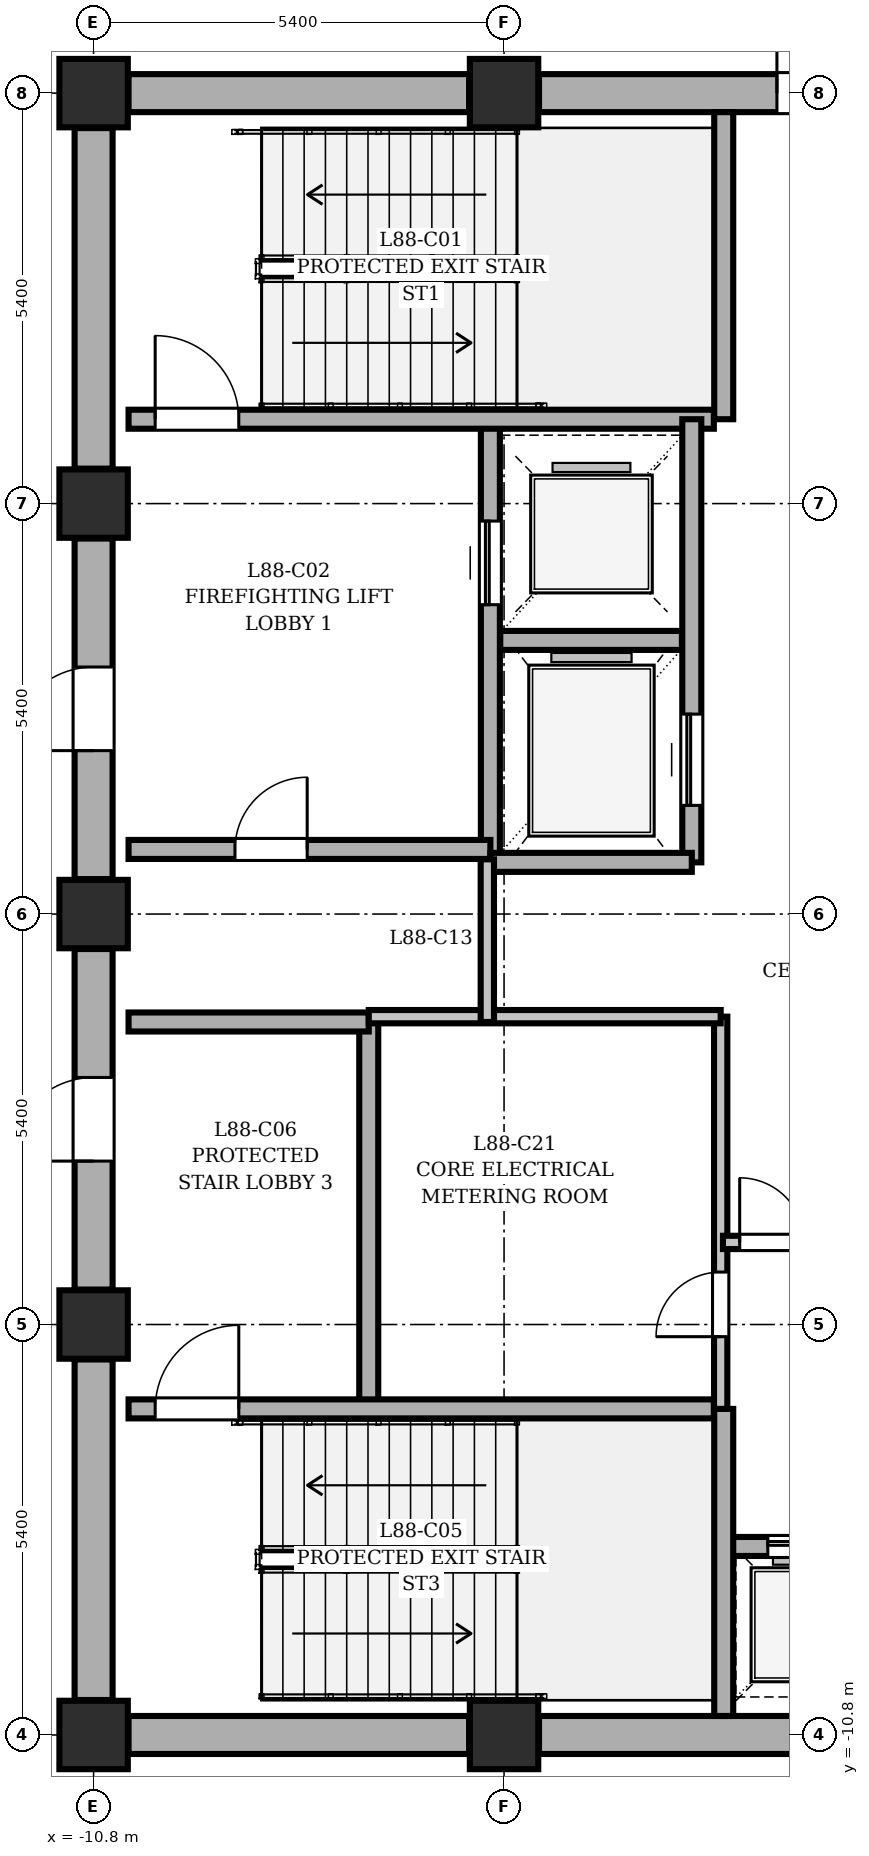
"""IFC4 building model, lengths in metres.
Left out: names, types, materials, properties, quantities, classifications, styles, units other than length and angle.
Written with IfcOpenShell. Run it as: python <this file> out.ifc"""

import sys

from ifc_helpers import new_model, si_unit, direction, frame, frame_2d, origin, origin_2d, place, context, subcontext, project, spatial, rectangle, extrude, element, fill, save


model = new_model("IFC4")
c1 = context("Model", 3, precision=1e-05, world=origin(), true_north=direction((0.0, 1.0)))
c2 = subcontext(c1, "Body", "Model", "MODEL_VIEW")
j1 = project(units=[si_unit("LENGTHUNIT", "METRE"), si_unit("PLANEANGLEUNIT", "RADIAN")], contexts=[c1])
p1 = place(None, origin())
s1 = spatial("IfcSite", under=j1, at=p1, CompositionType="ELEMENT")
p2 = place(p1, origin())
s2 = spatial("IfcBuilding", under=s1, at=p2, CompositionType="ELEMENT")
p3 = place(p2, frame((0.0, 0.0, 337.5)))
s3 = spatial("IfcBuildingStorey", under=s2, at=p3, CompositionType="ELEMENT", Elevation=337.5)
for number, where, z_axis, x_axis in (
    (1, (-10.8, -10.8, 0.0), (0.0, 0.0, 1.0), (1.0, 0.0, 0.0)),
    (2, (-10.8, -5.4, 0.0), (0.0, 0.0, 1.0), (1.0, 0.0, 0.0)),
    (3, (-10.8, 0.0, 0.0), (0.0, 0.0, 1.0), (1.0, 0.0, 0.0)),
    (4, (-10.8, 5.4, 0.0), (0.0, 0.0, 1.0), (1.0, 0.0, 0.0)),
    (5, (-10.8, 10.8, 0.0), (0.0, 0.0, 1.0), (1.0, 0.0, 0.0)),
    (6, (-5.4, -10.8, 0.0), (0.0, 0.0, 1.0), (1.0, 0.0, 0.0)),
    (7, (-5.4, 10.8, 0.0), (0.0, 0.0, 1.0), (1.0, 0.0, 0.0)),
):
    element("IfcColumn", number, at=place(p3, frame(where, z_axis=z_axis, x_axis=x_axis)), inside=s3, PredefinedType="COLUMN", context=c2, shape_type="SweptSolid", body=[
        extrude(rectangle(XDim=0.9, YDim=0.9, at=origin_2d()), origin(), (0.0, 0.0, 1.0), 4.5),
    ])
for number, where, z_axis, x_axis in (
    (8, (-10.34, -10.8, 0.0), (0.0, 0.0, 1.0), (1.0, 0.0, 0.0)),
    (9, (-10.34, 10.8, 0.0), (0.0, 0.0, 1.0), (1.0, 0.0, 0.0)),
    (10, (-10.8, -10.34, 0.0), (0.0, 0.0, 1.0), (0.0, 1.0, 0.0)),
    (11, (-4.94, -10.8, 0.0), (0.0, 0.0, 1.0), (1.0, 0.0, 0.0)),
):
    element("IfcWall", number, at=place(p3, frame(where, z_axis=z_axis, x_axis=x_axis)), inside=s3, PredefinedType="SHEAR", context=c2, shape_type="SweptSolid", body=[
        extrude(rectangle(XDim=4.48, YDim=0.5, at=frame_2d((2.24, 0.0))), origin(), (0.0, 0.0, 1.0), 4.5),
    ])
p4 = place(p3, frame((-4.94, 10.8, 0.0), z_axis=(0.0, 0.0, 1.0), x_axis=(1.0, 0.0, 0.0)))
e12 = element("IfcWall", 12, at=p4, inside=s3, PredefinedType="SHEAR", context=c2, shape_type="SweptSolid", body=[
    extrude(rectangle(XDim=4.48, YDim=0.5, at=frame_2d((2.24, 0.0))), origin(), (0.0, 0.0, 1.0), 4.5),
])
p5 = place(p4, frame((3.13, 0.0, 0.0)))
e13 = element("IfcOpeningElement", 13, at=p5, cuts=e12, PredefinedType="OPENING", context=c2, shape_type="SweptSolid", body=[
    extrude(rectangle(XDim=1.1, YDim=2.1, at=frame_2d((0.55, 1.05))), frame((0.0, 0.26, 0.0), z_axis=(0.0, -1.0, 0.0), x_axis=(1.0, 0.0, 0.0)), (0.0, 0.0, 1.0), 0.52),
])
p6 = place(p3, frame((-10.8, -4.94, 0.0), z_axis=(0.0, 0.0, 1.0), x_axis=(0.0, 1.0, 0.0)))
e14 = element("IfcWall", 14, at=p6, inside=s3, PredefinedType="SHEAR", context=c2, shape_type="SweptSolid", body=[
    extrude(rectangle(XDim=4.48, YDim=0.5, at=frame_2d((2.24, 0.0))), origin(), (0.0, 0.0, 1.0), 4.5),
])
p7 = place(p6, frame((1.69, 0.0, 0.0)))
e15 = element("IfcOpeningElement", 15, at=p7, cuts=e14, PredefinedType="OPENING", context=c2, shape_type="SweptSolid", body=[
    extrude(rectangle(XDim=1.1, YDim=2.1, at=frame_2d((0.55, 1.05))), frame((0.0, 0.26, 0.0), z_axis=(0.0, -1.0, 0.0), x_axis=(1.0, 0.0, 0.0)), (0.0, 0.0, 1.0), 0.52),
])
p8 = place(p3, frame((-10.8, 0.46, 0.0), z_axis=(0.0, 0.0, 1.0), x_axis=(0.0, 1.0, 0.0)))
e16 = element("IfcWall", 16, at=p8, inside=s3, PredefinedType="SHEAR", context=c2, shape_type="SweptSolid", body=[
    extrude(rectangle(XDim=4.48, YDim=0.5, at=frame_2d((2.24, 0.0))), origin(), (0.0, 0.0, 1.0), 4.5),
])
p9 = place(p8, frame((1.69, 0.0, 0.0)))
e17 = element("IfcOpeningElement", 17, at=p9, cuts=e16, PredefinedType="OPENING", context=c2, shape_type="SweptSolid", body=[
    extrude(rectangle(XDim=1.1, YDim=2.1, at=frame_2d((0.55, 1.05))), frame((0.0, 0.26, 0.0), z_axis=(0.0, -1.0, 0.0), x_axis=(1.0, 0.0, 0.0)), (0.0, 0.0, 1.0), 0.52),
])
p10 = place(p3, frame((-10.8, 5.86, 0.0), z_axis=(0.0, 0.0, 1.0), x_axis=(0.0, 1.0, 0.0)))
e18 = element("IfcWall", 18, at=p10, inside=s3, PredefinedType="SHEAR", context=c2, shape_type="SweptSolid", body=[
    extrude(rectangle(XDim=4.48, YDim=0.5, at=frame_2d((2.24, 0.0))), origin(), (0.0, 0.0, 1.0), 4.5),
])
p11 = place(p3, frame((-5.58, 0.72, 0.0), z_axis=(0.0, 0.0, 1.0), x_axis=(0.0, 1.0, 0.0)))
e19 = element("IfcWall", 19, at=p11, inside=s3, PredefinedType="SHEAR", context=c2, shape_type="SweptSolid", body=[
    extrude(rectangle(XDim=5.79, YDim=0.25, at=frame_2d((2.895, 0.0))), origin(), (0.0, 0.0, 1.0), 4.5),
])
p12 = place(p11, frame((3.35, 0.0, 0.0)))
e20 = element("IfcOpeningElement", 20, at=p12, cuts=e19, PredefinedType="OPENING", context=c2, shape_type="SweptSolid", body=[
    extrude(rectangle(XDim=1.1, YDim=2.1, at=frame_2d((0.55, 1.05))), frame((0.0, 0.135, 0.0), z_axis=(0.0, -1.0, 0.0), x_axis=(1.0, 0.0, 0.0)), (0.0, 0.0, 1.0), 0.27),
])
p13 = place(p3, frame((-10.34, 0.85, 0.0), z_axis=(0.0, 0.0, 1.0), x_axis=(1.0, 0.0, 0.0)))
e21 = element("IfcWall", 21, at=p13, inside=s3, PredefinedType="SHEAR", context=c2, shape_type="SweptSolid", body=[
    extrude(rectangle(XDim=4.76, YDim=0.25, at=frame_2d((2.38, 0.0))), origin(), (0.0, 0.0, 1.0), 4.5),
])
p14 = place(p13, frame((1.4, 0.0, 0.0)))
e22 = element("IfcOpeningElement", 22, at=p14, cuts=e21, PredefinedType="OPENING", context=c2, shape_type="SweptSolid", body=[
    extrude(rectangle(XDim=0.95, YDim=2.1, at=frame_2d((0.475, 1.05))), frame((0.0, 0.135, 0.0), z_axis=(0.0, -1.0, 0.0), x_axis=(1.0, 0.0, 0.0)), (0.0, 0.0, 1.0), 0.27),
])
p15 = place(p3, frame((-2.48, -8.32, 0.0), z_axis=(0.0, 0.0, 1.0), x_axis=(1.0, 0.0, 0.0)))
e23 = element("IfcWall", 23, at=p15, inside=s3, PredefinedType="SHEAR", context=c2, shape_type="SweptSolid", body=[
    extrude(rectangle(XDim=4.93, YDim=0.25, at=frame_2d((2.465, 0.0))), origin(), (0.0, 0.0, 1.0), 4.5),
])
p16 = place(p15, frame((0.55, 0.0, 0.0)))
e24 = element("IfcOpeningElement", 24, at=p16, cuts=e23, PredefinedType="OPENING", context=c2, shape_type="SweptSolid", body=[
    extrude(rectangle(XDim=1.1, YDim=2.1, at=frame_2d((0.55, 1.05))), frame((0.0, 0.135, 0.0), z_axis=(0.0, -1.0, 0.0), x_axis=(1.0, 0.0, 0.0)), (0.0, 0.0, 1.0), 0.27),
])
p17 = place(p15, frame((3.25, 0.0, 0.0)))
e25 = element("IfcOpeningElement", 25, at=p17, cuts=e23, PredefinedType="OPENING", context=c2, shape_type="SweptSolid", body=[
    extrude(rectangle(XDim=1.1, YDim=2.1, at=frame_2d((0.55, 1.05))), frame((0.0, 0.135, 0.0), z_axis=(0.0, -1.0, 0.0), x_axis=(1.0, 0.0, 0.0)), (0.0, 0.0, 1.0), 0.27),
])
p18 = place(p3, frame((-2.51, 6.51, 0.0), z_axis=(0.0, 0.0, 1.0), x_axis=(0.0, 1.0, 0.0)))
e26 = element("IfcWall", 26, at=p18, inside=s3, PredefinedType="SHEAR", context=c2, shape_type="SweptSolid", body=[
    extrude(rectangle(XDim=4.04, YDim=0.25, at=frame_2d((2.02, 0.0))), origin(), (0.0, 0.0, 1.0), 4.5),
])
p19 = place(p3, frame((-10.34, 6.51, 0.0), z_axis=(0.0, 0.0, 1.0), x_axis=(1.0, 0.0, 0.0)))
e27 = element("IfcWall", 27, at=p19, inside=s3, PredefinedType="SHEAR", context=c2, shape_type="SweptSolid", body=[
    extrude(rectangle(XDim=7.7, YDim=0.25, at=frame_2d((3.85, 0.0))), origin(), (0.0, 0.0, 1.0), 4.5),
])
p20 = place(p19, frame((0.35, 0.0, 0.0)))
e28 = element("IfcOpeningElement", 28, at=p20, cuts=e27, PredefinedType="OPENING", context=c2, shape_type="SweptSolid", body=[
    extrude(rectangle(XDim=1.1, YDim=2.1, at=frame_2d((0.55, 1.05))), frame((0.0, 0.135, 0.0), z_axis=(0.0, -1.0, 0.0), x_axis=(1.0, 0.0, 0.0)), (0.0, 0.0, 1.0), 0.27),
])
p21 = place(p3, frame((-2.51, -10.55, 0.0), z_axis=(0.0, 0.0, 1.0), x_axis=(0.0, 1.0, 0.0)))
e29 = element("IfcWall", 29, at=p21, inside=s3, PredefinedType="SHEAR", context=c2, shape_type="SweptSolid", body=[
    extrude(rectangle(XDim=4.04, YDim=0.25, at=frame_2d((2.02, 0.0))), origin(), (0.0, 0.0, 1.0), 4.5),
])
p22 = place(p3, frame((-7.18, -6.51, 0.0), z_axis=(0.0, 0.0, 1.0), x_axis=(0.0, 1.0, 0.0)))
e30 = element("IfcWall", 30, at=p22, inside=s3, PredefinedType="SHEAR", context=c2, shape_type="SweptSolid", body=[
    extrude(rectangle(XDim=5.09, YDim=0.25, at=frame_2d((2.545, 0.0))), origin(), (0.0, 0.0, 1.0), 4.5),
])
p23 = place(p3, frame((-10.34, -1.42, 0.0), z_axis=(0.0, 0.0, 1.0), x_axis=(1.0, 0.0, 0.0)))
e31 = element("IfcWall", 31, at=p23, inside=s3, PredefinedType="SHEAR", context=c2, shape_type="SweptSolid", body=[
    extrude(rectangle(XDim=3.16, YDim=0.25, at=frame_2d((1.58, 0.0))), origin(), (0.0, 0.0, 1.0), 4.5),
])
p24 = place(p3, frame((-10.34, -6.51, 0.0), z_axis=(0.0, 0.0, 1.0), x_axis=(1.0, 0.0, 0.0)))
e32 = element("IfcWall", 32, at=p24, inside=s3, PredefinedType="SHEAR", context=c2, shape_type="SweptSolid", body=[
    extrude(rectangle(XDim=7.7, YDim=0.25, at=frame_2d((3.85, 0.0))), origin(), (0.0, 0.0, 1.0), 4.5),
])
p25 = place(p24, frame((0.35, 0.0, 0.0)))
e33 = element("IfcOpeningElement", 33, at=p25, cuts=e32, PredefinedType="OPENING", context=c2, shape_type="SweptSolid", body=[
    extrude(rectangle(XDim=1.1, YDim=2.1, at=frame_2d((0.55, 1.05))), frame((0.0, 0.135, 0.0), z_axis=(0.0, -1.0, 0.0), x_axis=(1.0, 0.0, 0.0)), (0.0, 0.0, 1.0), 0.27),
])
p26 = place(p3, frame((-2.93, 0.68, 0.0), z_axis=(0.0, 0.0, 1.0), x_axis=(0.0, 1.0, 0.0)))
e34 = element("IfcWall", 34, at=p26, inside=s3, PredefinedType="SHEAR", context=c2, shape_type="SweptSolid", body=[
    extrude(rectangle(XDim=5.83, YDim=0.25, at=frame_2d((2.915, 0.0))), origin(), (0.0, 0.0, 1.0), 4.5),
])
p27 = place(p26, frame((0.75, 0.0, 0.0)))
e35 = element("IfcOpeningElement", 35, at=p27, cuts=e34, PredefinedType="OPENING", context=c2, shape_type="SweptSolid", body=[
    extrude(rectangle(XDim=1.2, YDim=2.1, at=frame_2d((0.6, 1.05))), frame((0.0, 0.135, 0.0), z_axis=(0.0, -1.0, 0.0), x_axis=(1.0, 0.0, 0.0)), (0.0, 0.0, 1.0), 0.27),
])
p28 = place(p3, frame((-5.45, 3.6, 0.0), z_axis=(0.0, 0.0, 1.0), x_axis=(1.0, 0.0, 0.0)))
e36 = element("IfcWall", 36, at=p28, inside=s3, PredefinedType="SHEAR", context=c2, shape_type="SweptSolid", body=[
    extrude(rectangle(XDim=2.39, YDim=0.25, at=frame_2d((1.195, 0.0))), origin(), (0.0, 0.0, 1.0), 4.5),
])
p29 = place(p3, frame((-5.58, 0.68, 0.0), z_axis=(0.0, 0.0, 1.0), x_axis=(1.0, 0.0, 0.0)))
e37 = element("IfcWall", 37, at=p29, inside=s3, PredefinedType="SHEAR", context=c2, shape_type="SweptSolid", body=[
    extrude(rectangle(XDim=2.65, YDim=0.25, at=frame_2d((1.325, 0.0))), origin(), (0.0, 0.0, 1.0), 4.5),
])
p30 = place(p3, frame((-2.55, -6.51, 0.0), z_axis=(0.0, 0.0, 1.0), x_axis=(0.0, 1.0, 0.0)))
e38 = element("IfcWall", 38, at=p30, inside=s3, PredefinedType="PARTITIONING", context=c2, shape_type="SweptSolid", body=[
    extrude(rectangle(XDim=5.16, YDim=0.175, at=frame_2d((2.58, 0.0))), origin(), (0.0, 0.0, 1.0), 4.22),
])
p31 = place(p30, frame((0.95, 0.0, 0.0)))
e39 = element("IfcOpeningElement", 39, at=p31, cuts=e38, PredefinedType="OPENING", context=c2, shape_type="SweptSolid", body=[
    extrude(rectangle(XDim=0.85, YDim=2.1, at=frame_2d((0.425, 1.05))), frame((0.0, 0.097, 0.0), z_axis=(0.0, -1.0, 0.0), x_axis=(1.0, 0.0, 0.0)), (0.0, 0.0, 1.0), 0.195),
])
p32 = place(p3, frame((-7.18, -1.35, 0.0), z_axis=(0.0, 0.0, 1.0), x_axis=(1.0, 0.0, 0.0)))
e40 = element("IfcWall", 40, at=p32, inside=s3, PredefinedType="PARTITIONING", context=c2, shape_type="SweptSolid", body=[
    extrude(rectangle(XDim=4.63, YDim=0.175, at=frame_2d((2.315, 0.0))), origin(), (0.0, 0.0, 1.0), 4.22),
])
p33 = place(p3, frame((-5.62, -1.42, 0.0), z_axis=(0.0, 0.0, 1.0), x_axis=(0.0, 1.0, 0.0)))
e41 = element("IfcWall", 41, at=p33, inside=s3, PredefinedType="PARTITIONING", context=c2, shape_type="SweptSolid", body=[
    extrude(rectangle(XDim=2.14, YDim=0.175, at=frame_2d((1.07, 0.0))), origin(), (0.0, 0.0, 1.0), 4.22),
])
p34 = place(p3, frame((-2.52, -4.32, 0.0), z_axis=(0.0, 0.0, 1.0), x_axis=(1.0, 0.0, 0.0)))
e42 = element("IfcWall", 42, at=p34, inside=s3, PredefinedType="PARTITIONING", context=c2, shape_type="SweptSolid", body=[
    extrude(rectangle(XDim=1.3, YDim=0.175, at=frame_2d((0.65, 0.0))), origin(), (0.0, 0.0, 1.0), 4.22),
])
p35 = place(p34, frame((0.22, 0.0, 0.0)))
e43 = element("IfcOpeningElement", 43, at=p35, cuts=e42, PredefinedType="OPENING", context=c2, shape_type="SweptSolid", body=[
    extrude(rectangle(XDim=0.85, YDim=2.1, at=frame_2d((0.425, 1.05))), frame((0.0, 0.097, 0.0), z_axis=(0.0, -1.0, 0.0), x_axis=(1.0, 0.0, 0.0)), (0.0, 0.0, 1.0), 0.195),
])
p36 = place(p20, origin())
e44 = element("IfcDoor", 44, at=p36, inside=s3, OperationType="SINGLE_SWING_LEFT", PredefinedType="DOOR", context=c2, shape_type="SweptSolid", body=[
    extrude(rectangle(XDim=1.1, YDim=2.1, at=frame_2d((0.55, 1.05))), frame((0.0, 0.025, 0.0), z_axis=(0.0, -1.0, 0.0), x_axis=(1.0, 0.0, 0.0)), (0.0, 0.0, 1.0), 0.05),
])
fill(e28, e44)
p37 = place(p25, origin())
e45 = element("IfcDoor", 45, at=p37, inside=s3, OperationType="SINGLE_SWING_RIGHT", PredefinedType="DOOR", context=c2, shape_type="SweptSolid", body=[
    extrude(rectangle(XDim=1.1, YDim=2.1, at=frame_2d((0.55, 1.05))), frame((0.0, 0.025, 0.0), z_axis=(0.0, -1.0, 0.0), x_axis=(1.0, 0.0, 0.0)), (0.0, 0.0, 1.0), 0.05),
])
fill(e33, e45)
p38 = place(p5, origin())
e46 = element("IfcDoor", 46, at=p38, inside=s3, OperationType="SINGLE_SWING_LEFT", PredefinedType="DOOR", context=c2, shape_type="SweptSolid", body=[
    extrude(rectangle(XDim=1.1, YDim=2.1, at=frame_2d((0.55, 1.05))), frame((0.0, 0.025, 0.0), z_axis=(0.0, -1.0, 0.0), x_axis=(1.0, 0.0, 0.0)), (0.0, 0.0, 1.0), 0.05),
])
fill(e13, e46)
p39 = place(p9, origin())
e47 = element("IfcDoor", 47, at=p39, inside=s3, OperationType="SINGLE_SWING_LEFT", PredefinedType="DOOR", context=c2, shape_type="SweptSolid", body=[
    extrude(rectangle(XDim=1.1, YDim=2.1, at=frame_2d((0.55, 1.05))), frame((0.0, 0.025, 0.0), z_axis=(0.0, -1.0, 0.0), x_axis=(1.0, 0.0, 0.0)), (0.0, 0.0, 1.0), 0.05),
])
fill(e17, e47)
p40 = place(p7, origin())
e48 = element("IfcDoor", 48, at=p40, inside=s3, OperationType="SINGLE_SWING_LEFT", PredefinedType="DOOR", context=c2, shape_type="SweptSolid", body=[
    extrude(rectangle(XDim=1.1, YDim=2.1, at=frame_2d((0.55, 1.05))), frame((0.0, 0.025, 0.0), z_axis=(0.0, -1.0, 0.0), x_axis=(1.0, 0.0, 0.0)), (0.0, 0.0, 1.0), 0.05),
])
fill(e15, e48)
p41 = place(p14, origin())
e49 = element("IfcDoor", 49, at=p41, inside=s3, OperationType="SINGLE_SWING_RIGHT", PredefinedType="DOOR", context=c2, shape_type="SweptSolid", body=[
    extrude(rectangle(XDim=0.95, YDim=2.1, at=frame_2d((0.475, 1.05))), frame((0.0, 0.025, 0.0), z_axis=(0.0, -1.0, 0.0), x_axis=(1.0, 0.0, 0.0)), (0.0, 0.0, 1.0), 0.05),
])
fill(e22, e49)
p42 = place(p12, origin())
e50 = element("IfcDoor", 50, at=p42, inside=s3, OperationType="SLIDING_TO_LEFT", PredefinedType="DOOR", context=c2, shape_type="SweptSolid", body=[
    extrude(rectangle(XDim=1.1, YDim=2.1, at=frame_2d((0.55, 1.05))), frame((0.0, 0.025, 0.0), z_axis=(0.0, -1.0, 0.0), x_axis=(1.0, 0.0, 0.0)), (0.0, 0.0, 1.0), 0.05),
])
fill(e20, e50)
p43 = place(p27, origin())
e51 = element("IfcDoor", 51, at=p43, inside=s3, OperationType="SLIDING_TO_LEFT", PredefinedType="DOOR", context=c2, shape_type="SweptSolid", body=[
    extrude(rectangle(XDim=1.2, YDim=2.1, at=frame_2d((0.6, 1.05))), frame((0.0, 0.025, 0.0), z_axis=(0.0, -1.0, 0.0), x_axis=(1.0, 0.0, 0.0)), (0.0, 0.0, 1.0), 0.05),
])
fill(e35, e51)
p44 = place(p35, origin())
e52 = element("IfcDoor", 52, at=p44, inside=s3, OperationType="SINGLE_SWING_LEFT", PredefinedType="DOOR", context=c2, shape_type="SweptSolid", body=[
    extrude(rectangle(XDim=0.85, YDim=2.1, at=frame_2d((0.425, 1.05))), frame((0.0, 0.025, 0.0), z_axis=(0.0, -1.0, 0.0), x_axis=(1.0, 0.0, 0.0)), (0.0, 0.0, 1.0), 0.05),
])
fill(e43, e52)
p45 = place(p16, origin())
e53 = element("IfcDoor", 53, at=p45, inside=s3, OperationType="SLIDING_TO_LEFT", PredefinedType="DOOR", context=c2, shape_type="SweptSolid", body=[
    extrude(rectangle(XDim=1.1, YDim=2.1, at=frame_2d((0.55, 1.05))), frame((0.0, 0.025, 0.0), z_axis=(0.0, -1.0, 0.0), x_axis=(1.0, 0.0, 0.0)), (0.0, 0.0, 1.0), 0.05),
])
fill(e24, e53)
p46 = place(p31, origin())
e54 = element("IfcDoor", 54, at=p46, inside=s3, OperationType="SINGLE_SWING_LEFT", PredefinedType="DOOR", context=c2, shape_type="SweptSolid", body=[
    extrude(rectangle(XDim=0.85, YDim=2.1, at=frame_2d((0.425, 1.05))), frame((0.0, 0.025, 0.0), z_axis=(0.0, -1.0, 0.0), x_axis=(1.0, 0.0, 0.0)), (0.0, 0.0, 1.0), 0.05),
])
fill(e39, e54)
save(model, sys.argv[1])
